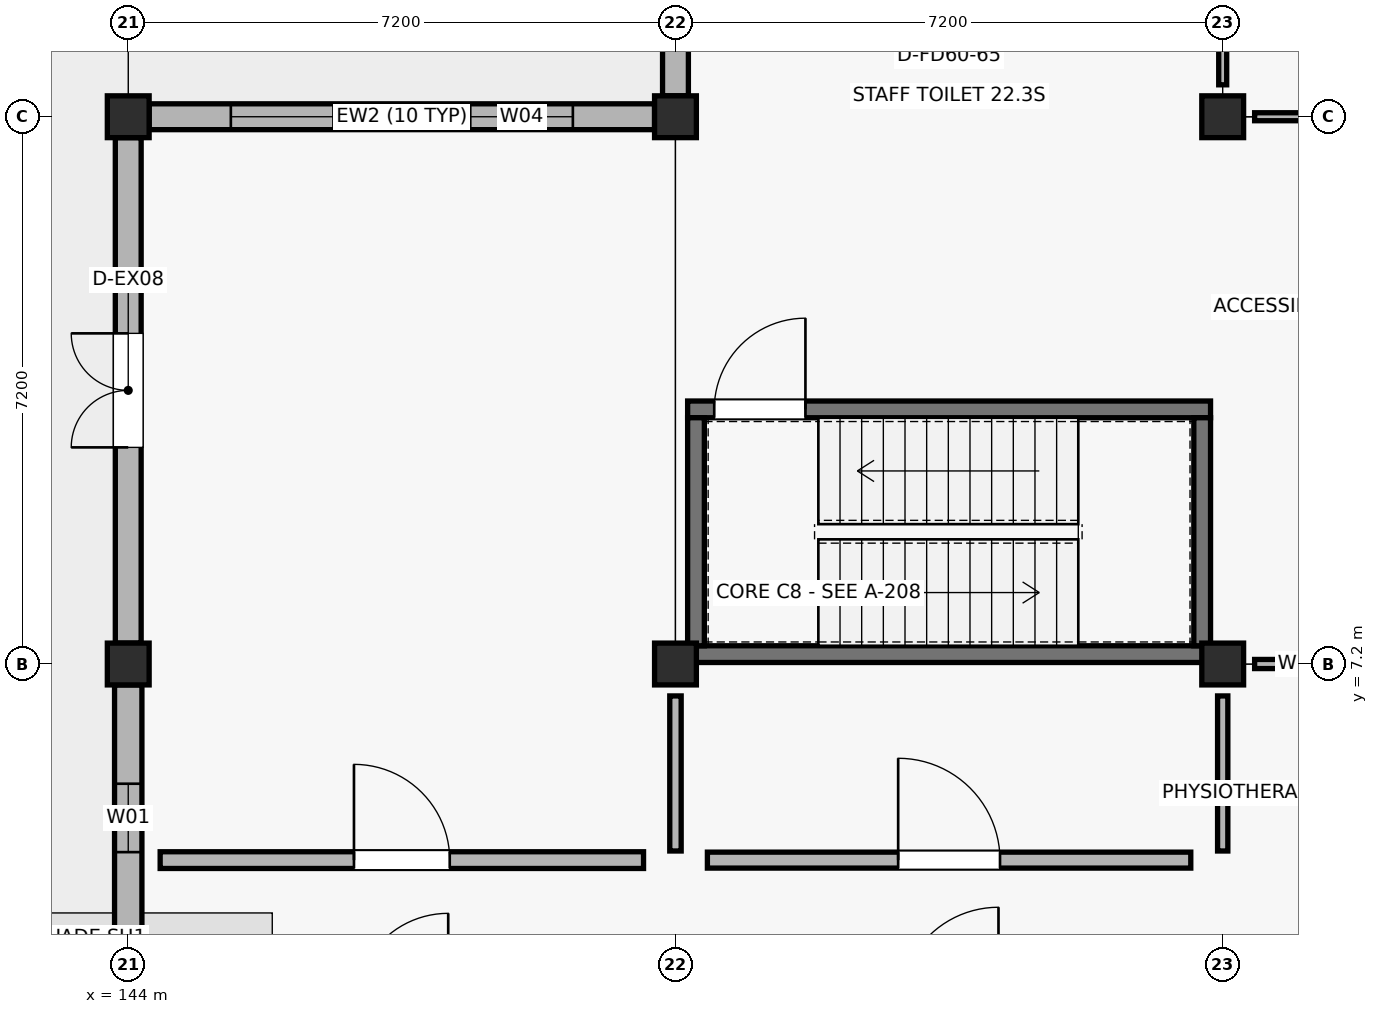
"""IFC4 building model, lengths in metres.
Left out: names, types, materials, properties, quantities, classifications, styles, units other than length and angle.
Written with IfcOpenShell. Run it as: python <this file> out.ifc"""

import sys

from ifc_helpers import new_model, si_unit, direction, frame, frame_2d, origin, origin_2d, place, context, subcontext, project, spatial, rectangle, extrude, element, fill, save


model = new_model("IFC4")
c1 = context("Model", 3, precision=1e-05, world=origin(), true_north=direction((0.0, 1.0)))
c2 = subcontext(c1, "Body", "Model", "MODEL_VIEW")
j1 = project(units=[si_unit("LENGTHUNIT", "METRE"), si_unit("PLANEANGLEUNIT", "RADIAN")], contexts=[c1])
p1 = place(None, origin())
s1 = spatial("IfcSite", under=j1, at=p1, CompositionType="ELEMENT")
p2 = place(p1, origin())
s2 = spatial("IfcBuilding", under=s1, at=p2, CompositionType="ELEMENT")
p3 = place(p2, origin())
s3 = spatial("IfcBuildingStorey", under=s2, at=p3, CompositionType="ELEMENT", Elevation=0.0)
for number, where, z_axis, x_axis in (
    (1, (144.0, 7.2, -0.25), (0.0, 0.0, 1.0), (1.0, 0.0, 0.0)),
    (2, (144.0, 14.4, -0.25), (0.0, 0.0, 1.0), (1.0, 0.0, 0.0)),
    (3, (151.2, 7.2, -0.25), (0.0, 0.0, 1.0), (1.0, 0.0, 0.0)),
    (4, (151.2, 14.4, -0.25), (0.0, 0.0, 1.0), (1.0, 0.0, 0.0)),
    (5, (158.4, 7.2, -0.25), (0.0, 0.0, 1.0), (1.0, 0.0, 0.0)),
    (6, (158.4, 14.4, -0.25), (0.0, 0.0, 1.0), (1.0, 0.0, 0.0)),
):
    element("IfcColumn", number, at=place(p3, frame(where, z_axis=z_axis, x_axis=x_axis)), inside=s3, PredefinedType="COLUMN", context=c2, shape_type="SweptSolid", body=[
        extrude(rectangle(XDim=0.55, YDim=0.55, at=origin_2d()), origin(), (0.0, 0.0, 1.0), 4.75),
    ])
p4 = place(p3, frame((144.0, 6.925, 0.0), z_axis=(0.0, 0.0, 1.0), x_axis=(0.0, -1.0, 0.0)))
e7 = element("IfcWall", 7, at=p4, inside=s3, PredefinedType="SOLIDWALL", context=c2, shape_type="SweptSolid", body=[
    extrude(rectangle(XDim=6.65, YDim=0.36, at=frame_2d((3.325, 0.0))), origin(), (0.0, 0.0, 1.0), 3.52),
])
p5 = place(p4, frame((1.3, 0.0, 0.9)))
e8 = element("IfcOpeningElement", 8, at=p5, cuts=e7, PredefinedType="OPENING", context=c2, shape_type="SweptSolid", body=[
    extrude(rectangle(XDim=0.9, YDim=1.25, at=frame_2d((0.45, 0.625))), frame((0.0, 0.19, 0.0), z_axis=(0.0, -1.0, 0.0), x_axis=(1.0, 0.0, 0.0)), (0.0, 0.0, 1.0), 0.38),
])
p6 = place(p4, frame((4.45, 0.0, 0.9)))
e9 = element("IfcOpeningElement", 9, at=p6, cuts=e7, PredefinedType="OPENING", context=c2, shape_type="SweptSolid", body=[
    extrude(rectangle(XDim=0.9, YDim=1.25, at=frame_2d((0.45, 0.625))), frame((0.0, 0.19, 0.0), z_axis=(0.0, -1.0, 0.0), x_axis=(1.0, 0.0, 0.0)), (0.0, 0.0, 1.0), 0.38),
])
p7 = place(p3, frame((150.925, 14.4, 0.0), z_axis=(0.0, 0.0, 1.0), x_axis=(-1.0, 0.0, 0.0)))
e10 = element("IfcWall", 10, at=p7, inside=s3, PredefinedType="SOLIDWALL", context=c2, shape_type="SweptSolid", body=[
    extrude(rectangle(XDim=6.65, YDim=0.34, at=frame_2d((3.325, 0.0))), origin(), (0.0, 0.0, 1.0), 3.47),
])
p8 = place(p7, frame((1.075, 0.0, 0.9)))
e11 = element("IfcOpeningElement", 11, at=p8, cuts=e10, PredefinedType="OPENING", context=c2, shape_type="SweptSolid", body=[
    extrude(rectangle(XDim=1.35, YDim=1.25, at=frame_2d((0.675, 0.625))), frame((0.0, 0.18, 0.0), z_axis=(0.0, -1.0, 0.0), x_axis=(1.0, 0.0, 0.0)), (0.0, 0.0, 1.0), 0.36),
])
p9 = place(p7, frame((4.225, 0.0, 0.9)))
e12 = element("IfcOpeningElement", 12, at=p9, cuts=e10, PredefinedType="OPENING", context=c2, shape_type="SweptSolid", body=[
    extrude(rectangle(XDim=1.35, YDim=1.25, at=frame_2d((0.675, 0.625))), frame((0.0, 0.18, 0.0), z_axis=(0.0, -1.0, 0.0), x_axis=(1.0, 0.0, 0.0)), (0.0, 0.0, 1.0), 0.36),
])
p10 = place(p3, frame((144.0, 7.475, 0.0), z_axis=(0.0, 0.0, 1.0), x_axis=(0.0, 1.0, 0.0)))
e13 = element("IfcWall", 13, at=p10, inside=s3, PredefinedType="SOLIDWALL", context=c2, shape_type="SweptSolid", body=[
    extrude(rectangle(XDim=6.65, YDim=0.34, at=frame_2d((3.325, 0.0))), origin(), (0.0, 0.0, 1.0), 3.52),
])
p11 = place(p10, frame((2.575, 0.0, 0.0)))
e14 = element("IfcOpeningElement", 14, at=p11, cuts=e13, PredefinedType="OPENING", context=c2, shape_type="SweptSolid", body=[
    extrude(rectangle(XDim=1.5, YDim=2.2, at=frame_2d((0.75, 1.1))), frame((0.0, 0.18, 0.0), z_axis=(0.0, -1.0, 0.0), x_axis=(1.0, 0.0, 0.0)), (0.0, 0.0, 1.0), 0.36),
])
p12 = place(p3, frame((151.2, 21.325, 0.0), z_axis=(0.0, 0.0, 1.0), x_axis=(0.0, -1.0, 0.0)))
e15 = element("IfcWall", 15, at=p12, inside=s3, PredefinedType="SOLIDWALL", context=c2, shape_type="SweptSolid", body=[
    extrude(rectangle(XDim=6.65, YDim=0.34, at=frame_2d((3.325, 0.0))), origin(), (0.0, 0.0, 1.0), 3.52),
])
p13 = place(p12, frame((1.225, 0.0, 0.9)))
e16 = element("IfcOpeningElement", 16, at=p13, cuts=e15, PredefinedType="OPENING", context=c2, shape_type="SweptSolid", body=[
    extrude(rectangle(XDim=1.05, YDim=1.5, at=frame_2d((0.525, 0.75))), frame((0.0, 0.18, 0.0), z_axis=(0.0, -1.0, 0.0), x_axis=(1.0, 0.0, 0.0)), (0.0, 0.0, 1.0), 0.36),
])
p14 = place(p12, frame((4.375, 0.0, 0.9)))
e17 = element("IfcOpeningElement", 17, at=p14, cuts=e15, PredefinedType="OPENING", context=c2, shape_type="SweptSolid", body=[
    extrude(rectangle(XDim=1.05, YDim=1.5, at=frame_2d((0.525, 0.75))), frame((0.0, 0.18, 0.0), z_axis=(0.0, -1.0, 0.0), x_axis=(1.0, 0.0, 0.0)), (0.0, 0.0, 1.0), 0.36),
])
p15 = place(p3, frame((151.36, 7.33, -0.25), z_axis=(0.0, 0.0, 1.0), x_axis=(1.0, 0.0, 0.0)))
e18 = element("IfcWall", 18, at=p15, inside=s3, PredefinedType="SHEAR", context=c2, shape_type="SweptSolid", body=[
    extrude(rectangle(XDim=6.88, YDim=0.22, at=frame_2d((3.44, 0.0))), origin(), (0.0, 0.0, 1.0), 4.47),
])
p16 = place(p3, frame((151.36, 10.55, -0.25), z_axis=(0.0, 0.0, 1.0), x_axis=(1.0, 0.0, 0.0)))
e19 = element("IfcWall", 19, at=p16, inside=s3, PredefinedType="SHEAR", context=c2, shape_type="SweptSolid", body=[
    extrude(rectangle(XDim=6.88, YDim=0.22, at=frame_2d((3.44, 0.0))), origin(), (0.0, 0.0, 1.0), 4.47),
])
p17 = place(p16, frame((0.35, 0.0, 0.25)))
e20 = element("IfcOpeningElement", 20, at=p17, cuts=e19, PredefinedType="OPENING", context=c2, shape_type="SweptSolid", body=[
    extrude(rectangle(XDim=1.2, YDim=2.15, at=frame_2d((0.6, 1.075))), frame((0.0, 0.12, 0.0), z_axis=(0.0, -1.0, 0.0), x_axis=(1.0, 0.0, 0.0)), (0.0, 0.0, 1.0), 0.24),
])
for number, where, z_axis, x_axis in (
    (21, (151.47, 7.44, -0.25), (0.0, 0.0, 1.0), (0.0, 1.0, 0.0)),
    (22, (158.13, 7.44, -0.25), (0.0, 0.0, 1.0), (0.0, 1.0, 0.0)),
):
    element("IfcWall", number, at=place(p3, frame(where, z_axis=z_axis, x_axis=x_axis)), inside=s3, PredefinedType="SHEAR", context=c2, shape_type="SweptSolid", body=[
        extrude(rectangle(XDim=3.0, YDim=0.22, at=frame_2d((1.5, 0.0))), origin(), (0.0, 0.0, 1.0), 4.47),
    ])
p18 = place(p3, frame((144.42, 4.62, 0.0), z_axis=(0.0, 0.0, 1.0), x_axis=(1.0, 0.0, 0.0)))
e23 = element("IfcWall", 23, at=p18, inside=s3, PredefinedType="SOLIDWALL", context=c2, shape_type="SweptSolid", body=[
    extrude(rectangle(XDim=6.36, YDim=0.22, at=frame_2d((3.18, 0.0))), origin(), (0.0, 0.0, 1.0), 3.36),
])
p19 = place(p18, frame((2.55, 0.0, 0.0)))
e24 = element("IfcOpeningElement", 24, at=p19, cuts=e23, PredefinedType="OPENING", context=c2, shape_type="SweptSolid", body=[
    extrude(rectangle(XDim=1.26, YDim=2.19, at=frame_2d((0.63, 1.095))), frame((0.0, 0.12, 0.0), z_axis=(0.0, -1.0, 0.0), x_axis=(1.0, 0.0, 0.0)), (0.0, 0.0, 1.0), 0.24),
])
p20 = place(p3, frame((151.2, 4.74, 0.0), z_axis=(0.0, 0.0, 1.0), x_axis=(0.0, 1.0, 0.0)))
e25 = element("IfcWall", 25, at=p20, inside=s3, PredefinedType="PARTITIONING", context=c2, shape_type="SweptSolid", body=[
    extrude(rectangle(XDim=2.04, YDim=0.15, at=frame_2d((1.02, 0.0))), origin(), (0.0, 0.0, 1.0), 3.36),
])
p21 = place(p3, frame((151.62, 4.62, 0.0), z_axis=(0.0, 0.0, 1.0), x_axis=(1.0, 0.0, 0.0)))
e26 = element("IfcWall", 26, at=p21, inside=s3, PredefinedType="PLUMBINGWALL", context=c2, shape_type="SweptSolid", body=[
    extrude(rectangle(XDim=6.36, YDim=0.21, at=frame_2d((3.18, 0.0))), origin(), (0.0, 0.0, 1.0), 3.36),
])
p22 = place(p21, frame((2.51, 0.0, 0.0)))
e27 = element("IfcOpeningElement", 27, at=p22, cuts=e26, PredefinedType="OPENING", context=c2, shape_type="SweptSolid", body=[
    extrude(rectangle(XDim=1.34, YDim=2.19, at=frame_2d((0.67, 1.095))), frame((0.0, 0.115, 0.0), z_axis=(0.0, -1.0, 0.0), x_axis=(1.0, 0.0, 0.0)), (0.0, 0.0, 1.0), 0.23),
])
p23 = place(p3, frame((158.4, 4.74, 0.0), z_axis=(0.0, 0.0, 1.0), x_axis=(0.0, 1.0, 0.0)))
e28 = element("IfcWall", 28, at=p23, inside=s3, PredefinedType="PARTITIONING", context=c2, shape_type="SweptSolid", body=[
    extrude(rectangle(XDim=2.04, YDim=0.135, at=frame_2d((1.02, 0.0))), origin(), (0.0, 0.0, 1.0), 3.36),
])
p24 = place(p3, frame((158.4, 14.82, 0.0), z_axis=(0.0, 0.0, 1.0), x_axis=(0.0, 1.0, 0.0)))
e29 = element("IfcWall", 29, at=p24, inside=s3, PredefinedType="PARTITIONING", context=c2, shape_type="SweptSolid", body=[
    extrude(rectangle(XDim=2.16, YDim=0.105, at=frame_2d((1.08, 0.0))), origin(), (0.0, 0.0, 1.0), 3.36),
])
p25 = place(p3, frame((158.82, 7.2, 0.0), z_axis=(0.0, 0.0, 1.0), x_axis=(1.0, 0.0, 0.0)))
e30 = element("IfcWall", 30, at=p25, inside=s3, PredefinedType="PARTITIONING", context=c2, shape_type="SweptSolid", body=[
    extrude(rectangle(XDim=2.16, YDim=0.12, at=frame_2d((1.08, 0.0))), origin(), (0.0, 0.0, 1.0), 3.36),
])
p26 = place(p3, frame((158.82, 14.4, 0.0), z_axis=(0.0, 0.0, 1.0), x_axis=(1.0, 0.0, 0.0)))
e31 = element("IfcWall", 31, at=p26, inside=s3, PredefinedType="PARTITIONING", context=c2, shape_type="SweptSolid", body=[
    extrude(rectangle(XDim=2.16, YDim=0.105, at=frame_2d((1.08, 0.0))), origin(), (0.0, 0.0, 1.0), 3.36),
])
p27 = place(p5, origin())
e32 = element("IfcWindow", 32, at=p27, inside=s3, PartitioningType="SINGLE_PANEL", PredefinedType="WINDOW", context=c2, shape_type="SweptSolid", body=[
    extrude(rectangle(XDim=0.9, YDim=1.25, at=frame_2d((0.45, 0.625))), frame((0.0, 0.03, 0.0), z_axis=(0.0, -1.0, 0.0), x_axis=(1.0, 0.0, 0.0)), (0.0, 0.0, 1.0), 0.06),
])
fill(e8, e32)
p28 = place(p8, origin())
e33 = element("IfcWindow", 33, at=p28, inside=s3, PartitioningType="SINGLE_PANEL", PredefinedType="WINDOW", context=c2, shape_type="SweptSolid", body=[
    extrude(rectangle(XDim=1.35, YDim=1.25, at=frame_2d((0.675, 0.625))), frame((0.0, 0.03, 0.0), z_axis=(0.0, -1.0, 0.0), x_axis=(1.0, 0.0, 0.0)), (0.0, 0.0, 1.0), 0.06),
])
fill(e11, e33)
p29 = place(p9, origin())
e34 = element("IfcWindow", 34, at=p29, inside=s3, PartitioningType="SINGLE_PANEL", PredefinedType="WINDOW", context=c2, shape_type="SweptSolid", body=[
    extrude(rectangle(XDim=1.35, YDim=1.25, at=frame_2d((0.675, 0.625))), frame((0.0, 0.03, 0.0), z_axis=(0.0, -1.0, 0.0), x_axis=(1.0, 0.0, 0.0)), (0.0, 0.0, 1.0), 0.06),
])
fill(e12, e34)
p30 = place(p11, origin())
e35 = element("IfcDoor", 35, at=p30, inside=s3, OperationType="DOUBLE_DOOR_SINGLE_SWING", PredefinedType="DOOR", context=c2, shape_type="SweptSolid", body=[
    extrude(rectangle(XDim=1.5, YDim=2.2, at=frame_2d((0.75, 1.1))), frame((0.0, 0.025, 0.0), z_axis=(0.0, -1.0, 0.0), x_axis=(1.0, 0.0, 0.0)), (0.0, 0.0, 1.0), 0.05),
])
fill(e14, e35)
p31 = place(p17, origin())
e36 = element("IfcDoor", 36, at=p31, inside=s3, OperationType="SINGLE_SWING_RIGHT", PredefinedType="DOOR", context=c2, shape_type="SweptSolid", body=[
    extrude(rectangle(XDim=1.2, YDim=2.15, at=frame_2d((0.6, 1.075))), frame((0.0, 0.025, 0.0), z_axis=(0.0, -1.0, 0.0), x_axis=(1.0, 0.0, 0.0)), (0.0, 0.0, 1.0), 0.05),
])
fill(e20, e36)
p32 = place(p19, origin())
e37 = element("IfcDoor", 37, at=p32, inside=s3, OperationType="SINGLE_SWING_LEFT", PredefinedType="DOOR", context=c2, shape_type="SweptSolid", body=[
    extrude(rectangle(XDim=1.26, YDim=2.19, at=frame_2d((0.63, 1.095))), frame((0.0, 0.025, 0.0), z_axis=(0.0, -1.0, 0.0), x_axis=(1.0, 0.0, 0.0)), (0.0, 0.0, 1.0), 0.05),
])
fill(e24, e37)
p33 = place(p22, origin())
e38 = element("IfcDoor", 38, at=p33, inside=s3, OperationType="SINGLE_SWING_LEFT", PredefinedType="DOOR", context=c2, shape_type="SweptSolid", body=[
    extrude(rectangle(XDim=1.34, YDim=2.19, at=frame_2d((0.67, 1.095))), frame((0.0, 0.025, 0.0), z_axis=(0.0, -1.0, 0.0), x_axis=(1.0, 0.0, 0.0)), (0.0, 0.0, 1.0), 0.05),
])
fill(e27, e38)
save(model, sys.argv[1])
